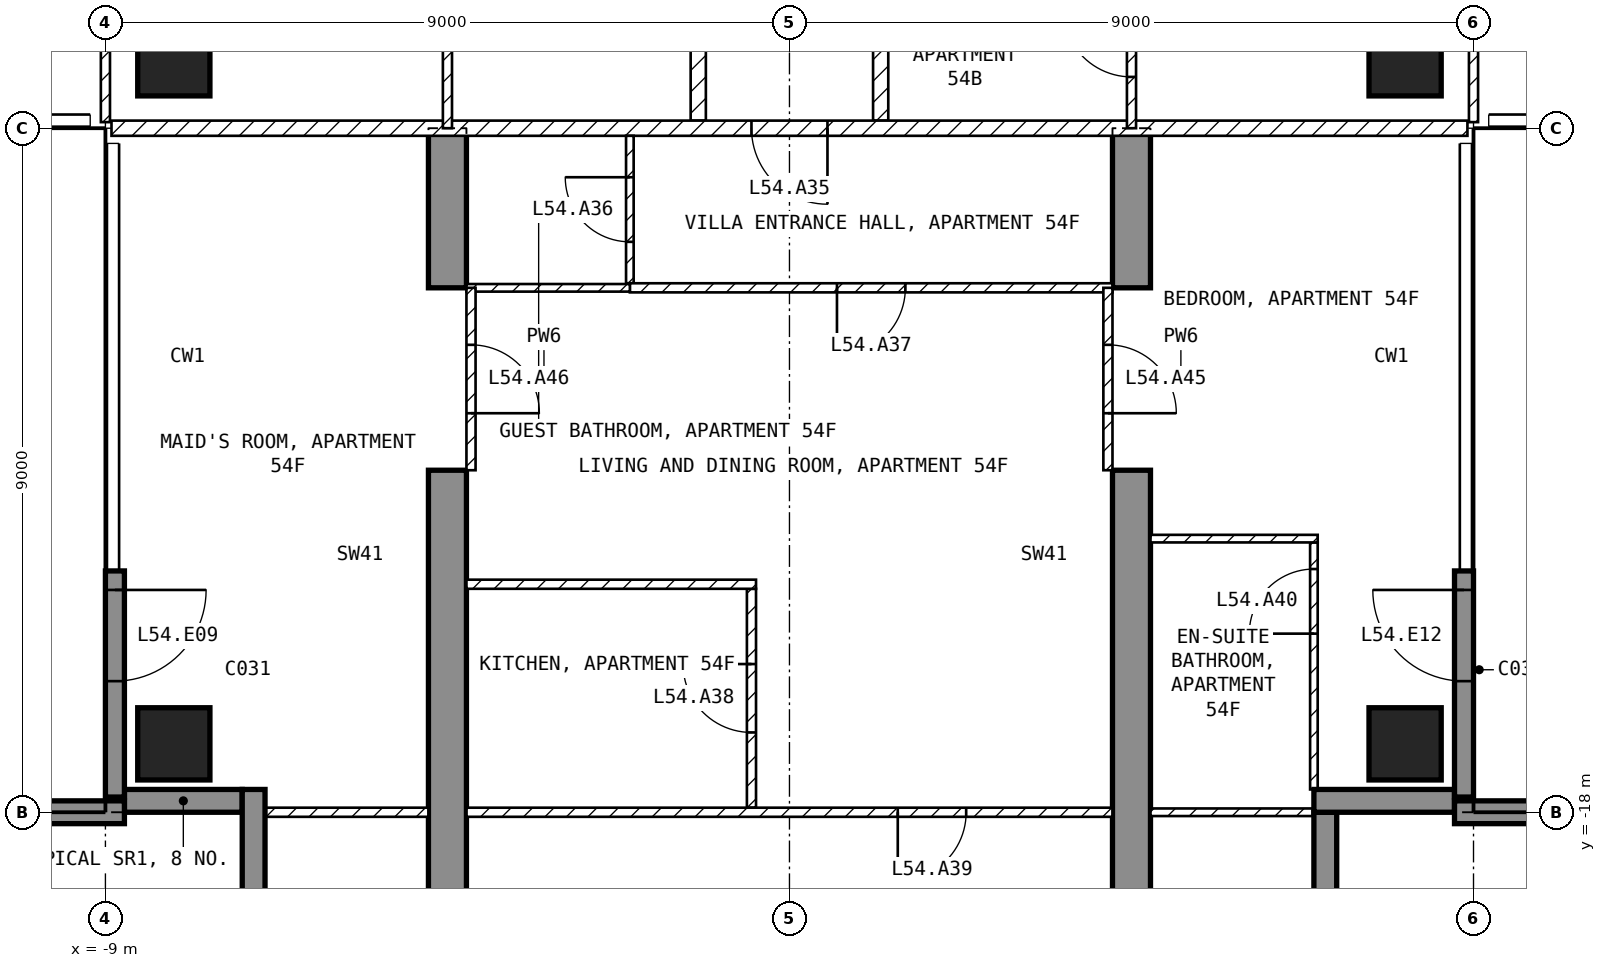
"""IFC4 building model, lengths in metres.
Left out: names, types, materials, properties, quantities, classifications, styles, units other than length and angle.
Written with IfcOpenShell. Run it as: python <this file> out.ifc"""

import sys

from ifc_helpers import new_model, si_unit, direction, frame, frame_2d, origin, origin_2d, place, context, subcontext, project, spatial, polyline, rectangle, outline, extrude, element, fill, save


model = new_model("IFC4")
c1 = context("Model", 3, precision=1e-05, world=origin(), true_north=direction((0.0, 1.0)))
c2 = subcontext(c1, "Body", "Model", "MODEL_VIEW")
j1 = project(units=[si_unit("LENGTHUNIT", "METRE"), si_unit("PLANEANGLEUNIT", "RADIAN")], contexts=[c1])
p1 = place(None, origin())
s1 = spatial("IfcSite", under=j1, at=p1, CompositionType="ELEMENT")
p2 = place(p1, origin())
s2 = spatial("IfcBuilding", under=s1, at=p2, CompositionType="ELEMENT")
p3 = place(p2, frame((0.0, 0.0, 215.6)))
s3 = spatial("IfcBuildingStorey", under=s2, at=p3, CompositionType="ELEMENT", Elevation=215.6)
for number, where, z_axis, x_axis in (
    (1, (-8.1, -17.1, -0.25), (0.0, 0.0, 1.0), (1.0, 0.0, 0.0)),
    (2, (-8.1, -8.1, -0.25), (0.0, 0.0, 1.0), (1.0, 0.0, 0.0)),
    (3, (8.1, -17.1, -0.25), (0.0, 0.0, 1.0), (1.0, 0.0, 0.0)),
    (4, (8.1, -8.1, -0.25), (0.0, 0.0, 1.0), (1.0, 0.0, 0.0)),
):
    element("IfcColumn", number, at=place(p3, frame(where, z_axis=z_axis, x_axis=x_axis)), inside=s3, PredefinedType="COLUMN", context=c2, shape_type="SweptSolid", body=[
        extrude(rectangle(XDim=0.95, YDim=0.95, at=origin_2d()), origin(), (0.0, 0.0, 1.0), 3.5),
    ])
for number, where, z_axis, x_axis in (
    (5, (-4.75, -20.225, -0.25), (1.0, 0.0, 0.0), (0.0, 1.0, 0.0)),
    (6, (4.25, -20.225, -0.25), (1.0, 0.0, 0.0), (0.0, 1.0, 0.0)),
):
    element("IfcWall", number, at=place(p3, frame(where, z_axis=z_axis, x_axis=x_axis)), inside=s3, PredefinedType="SHEAR", context=c2, shape_type="SweptSolid", body=[
        extrude(outline(polyline([(0.0, 0.0), (6.725, 0.0), (6.725, 2.65), (9.125, 2.65), (9.125, 0.0), (11.225, 0.0), (11.225, 3.5), (0.0, 3.5), (0.0, 0.0)])), origin(), (0.0, 0.0, 1.0), 0.5),
    ])
p4 = place(p3, frame((-8.875, -14.825, 0.0), z_axis=(0.0, 0.0, 1.0), x_axis=(0.0, -1.0, 0.0)))
e7 = element("IfcWall", 7, at=p4, inside=s3, PredefinedType="SOLIDWALL", context=c2, shape_type="SweptSolid", body=[
    extrude(rectangle(XDim=2.975, YDim=0.25, at=frame_2d((1.488, 0.0))), origin(), (0.0, 0.0, 1.0), 3.25),
])
p5 = place(p4, frame((0.25, 0.0, 0.0)))
e8 = element("IfcOpeningElement", 8, at=p5, cuts=e7, PredefinedType="OPENING", context=c2, shape_type="SweptSolid", body=[
    extrude(rectangle(XDim=1.2, YDim=2.4, at=frame_2d((0.6, 1.2))), frame((0.0, 0.135, 0.0), z_axis=(0.0, -1.0, 0.0), x_axis=(1.0, 0.0, 0.0)), (0.0, 0.0, 1.0), 0.27),
])
p6 = place(p3, frame((8.875, -17.8, 0.0), z_axis=(0.0, 0.0, 1.0), x_axis=(0.0, 1.0, 0.0)))
e9 = element("IfcWall", 9, at=p6, inside=s3, PredefinedType="SOLIDWALL", context=c2, shape_type="SweptSolid", body=[
    extrude(rectangle(XDim=2.975, YDim=0.25, at=frame_2d((1.488, 0.0))), origin(), (0.0, 0.0, 1.0), 3.25),
])
p7 = place(p6, frame((1.525, 0.0, 0.0)))
e10 = element("IfcOpeningElement", 10, at=p7, cuts=e9, PredefinedType="OPENING", context=c2, shape_type="SweptSolid", body=[
    extrude(rectangle(XDim=1.2, YDim=2.4, at=frame_2d((0.6, 1.2))), frame((0.0, 0.135, 0.0), z_axis=(0.0, -1.0, 0.0), x_axis=(1.0, 0.0, 0.0)), (0.0, 0.0, 1.0), 0.27),
])
p8 = place(p3, frame((7.05, -19.8, 0.0), z_axis=(0.0, 0.0, 1.0), x_axis=(0.0, 1.0, 0.0)))
e11 = element("IfcWall", 11, at=p8, inside=s3, PredefinedType="SOLIDWALL", context=c2, shape_type="SweptSolid", body=[
    extrude(rectangle(XDim=1.8, YDim=0.3, at=frame_2d((0.9, 0.0))), origin(), (0.0, 0.0, 1.0), 3.25),
])
p9 = place(p3, frame((6.9, -17.85, 0.0), z_axis=(0.0, 0.0, 1.0), x_axis=(1.0, 0.0, 0.0)))
e12 = element("IfcWall", 12, at=p9, inside=s3, PredefinedType="SOLIDWALL", context=c2, shape_type="SweptSolid", body=[
    extrude(rectangle(XDim=1.85, YDim=0.3, at=frame_2d((0.925, 0.0))), origin(), (0.0, 0.0, 1.0), 3.25),
])
p10 = place(p3, frame((-8.75, -17.85, 0.0), z_axis=(0.0, 0.0, 1.0), x_axis=(1.0, 0.0, 0.0)))
e13 = element("IfcWall", 13, at=p10, inside=s3, PredefinedType="SOLIDWALL", context=c2, shape_type="SweptSolid", body=[
    extrude(rectangle(XDim=1.55, YDim=0.3, at=frame_2d((0.775, 0.0))), origin(), (0.0, 0.0, 1.0), 3.25),
])
p11 = place(p3, frame((-7.05, -17.7, 0.0), z_axis=(0.0, 0.0, 1.0), x_axis=(0.0, -1.0, 0.0)))
e14 = element("IfcWall", 14, at=p11, inside=s3, PredefinedType="SOLIDWALL", context=c2, shape_type="SweptSolid", body=[
    extrude(rectangle(XDim=1.8, YDim=0.3, at=frame_2d((0.9, 0.0))), origin(), (0.0, 0.0, 1.0), 3.25),
])
for number, where, z_axis, x_axis in (
    (15, (-8.75, -18.0, 0.0), (0.0, 0.0, 1.0), (-1.0, 0.0, 0.0)),
    (16, (8.75, -18.0, 0.0), (0.0, 0.0, 1.0), (1.0, 0.0, 0.0)),
):
    element("IfcWall", number, at=place(p3, frame(where, z_axis=z_axis, x_axis=x_axis)), inside=s3, PredefinedType="SOLIDWALL", context=c2, shape_type="SweptSolid", body=[
        extrude(rectangle(XDim=2.95, YDim=0.3, at=frame_2d((1.475, 0.0))), origin(), (0.0, 0.0, 1.0), 3.25),
    ])
for number, where, z_axis, x_axis in (
    (17, (1.2, -4.6, 0.0), (0.0, 0.0, 1.0), (0.0, -1.0, 0.0)),
    (18, (-1.2, -8.9, 0.0), (0.0, 0.0, 1.0), (0.0, 1.0, 0.0)),
):
    element("IfcWall", number, at=place(p3, frame(where, z_axis=z_axis, x_axis=x_axis)), inside=s3, PredefinedType="PARTITIONING", context=c2, shape_type="SweptSolid", body=[
        extrude(rectangle(XDim=4.3, YDim=0.2, at=frame_2d((2.15, 0.0))), origin(), (0.0, 0.0, 1.0), 3.25),
    ])
p12 = place(p3, frame((8.92, -9.0, 0.0), z_axis=(0.0, 0.0, 1.0), x_axis=(-1.0, 0.0, 0.0)))
e19 = element("IfcWall", 19, at=p12, inside=s3, PredefinedType="PARTITIONING", context=c2, shape_type="SweptSolid", body=[
    extrude(rectangle(XDim=17.84, YDim=0.2, at=frame_2d((8.92, 0.0))), origin(), (0.0, 0.0, 1.0), 3.25),
])
p13 = place(p12, frame((8.42, 0.0, 0.0)))
e20 = element("IfcOpeningElement", 20, at=p13, cuts=e19, PredefinedType="OPENING", context=c2, shape_type="SweptSolid", body=[
    extrude(rectangle(XDim=1.0, YDim=2.1, at=frame_2d((0.5, 1.05))), frame((0.0, 0.11, 0.0), z_axis=(0.0, -1.0, 0.0), x_axis=(1.0, 0.0, 0.0)), (0.0, 0.0, 1.0), 0.22),
])
p14 = place(p3, frame((9.0, -8.92, 0.0), z_axis=(0.0, 0.0, 1.0), x_axis=(0.0, 1.0, 0.0)))
e21 = element("IfcWall", 21, at=p14, inside=s3, PredefinedType="PARTITIONING", context=c2, shape_type="SweptSolid", body=[
    extrude(rectangle(XDim=7.62, YDim=0.12, at=frame_2d((3.81, 0.0))), origin(), (0.0, 0.0, 1.0), 3.25),
])
p15 = place(p14, frame((2.42, 0.0, 0.0)))
e22 = element("IfcOpeningElement", 22, at=p15, cuts=e21, PredefinedType="OPENING", context=c2, shape_type="SweptSolid", body=[
    extrude(rectangle(XDim=0.9, YDim=2.1, at=frame_2d((0.45, 1.05))), frame((0.0, 0.07, 0.0), z_axis=(0.0, -1.0, 0.0), x_axis=(1.0, 0.0, 0.0)), (0.0, 0.0, 1.0), 0.14),
])
p16 = place(p3, frame((4.5, -9.0, 0.0), z_axis=(0.0, 0.0, 1.0), x_axis=(0.0, 1.0, 0.0)))
e23 = element("IfcWall", 23, at=p16, inside=s3, PredefinedType="PARTITIONING", context=c2, shape_type="SweptSolid", body=[
    extrude(rectangle(XDim=2.25, YDim=0.12, at=frame_2d((1.125, 0.0))), origin(), (0.0, 0.0, 1.0), 3.25),
])
p17 = place(p16, frame((0.675, 0.0, 0.0)))
e24 = element("IfcOpeningElement", 24, at=p17, cuts=e23, PredefinedType="OPENING", context=c2, shape_type="SweptSolid", body=[
    extrude(rectangle(XDim=0.9, YDim=2.1, at=frame_2d((0.45, 1.05))), frame((0.0, 0.07, 0.0), z_axis=(0.0, -1.0, 0.0), x_axis=(1.0, 0.0, 0.0)), (0.0, 0.0, 1.0), 0.14),
])
p18 = place(p3, frame((-9.0, -4.56, 0.0), z_axis=(0.0, 0.0, 1.0), x_axis=(0.0, -1.0, 0.0)))
e25 = element("IfcWall", 25, at=p18, inside=s3, PredefinedType="PARTITIONING", context=c2, shape_type="SweptSolid", body=[
    extrude(rectangle(XDim=4.36, YDim=0.12, at=frame_2d((2.18, 0.0))), origin(), (0.0, 0.0, 1.0), 3.25),
])
p19 = place(p18, frame((1.02, 0.0, 0.0)))
e26 = element("IfcOpeningElement", 26, at=p19, cuts=e25, PredefinedType="OPENING", context=c2, shape_type="SweptSolid", body=[
    extrude(rectangle(XDim=0.9, YDim=2.1, at=frame_2d((0.45, 1.05))), frame((0.0, 0.07, 0.0), z_axis=(0.0, -1.0, 0.0), x_axis=(1.0, 0.0, 0.0)), (0.0, 0.0, 1.0), 0.14),
])
p20 = place(p3, frame((-4.5, -4.6, 0.0), z_axis=(0.0, 0.0, 1.0), x_axis=(0.0, -1.0, 0.0)))
e27 = element("IfcWall", 27, at=p20, inside=s3, PredefinedType="PARTITIONING", context=c2, shape_type="SweptSolid", body=[
    extrude(rectangle(XDim=4.4, YDim=0.12, at=frame_2d((2.2, 0.0))), origin(), (0.0, 0.0, 1.0), 3.25),
])
p21 = place(p20, frame((1.75, 0.0, 0.0)))
e28 = element("IfcOpeningElement", 28, at=p21, cuts=e27, PredefinedType="OPENING", context=c2, shape_type="SweptSolid", body=[
    extrude(rectangle(XDim=0.9, YDim=2.1, at=frame_2d((0.45, 1.05))), frame((0.0, 0.07, 0.0), z_axis=(0.0, -1.0, 0.0), x_axis=(1.0, 0.0, 0.0)), (0.0, 0.0, 1.0), 0.14),
])
p22 = place(p3, frame((-2.1, -11.04, 0.0), z_axis=(0.0, 0.0, 1.0), x_axis=(0.0, 1.0, 0.0)))
e29 = element("IfcWall", 29, at=p22, inside=s3, PredefinedType="PARTITIONING", context=c2, shape_type="SweptSolid", body=[
    extrude(rectangle(XDim=1.94, YDim=0.1, at=frame_2d((0.97, 0.0))), origin(), (0.0, 0.0, 1.0), 3.25),
])
p23 = place(p22, frame((0.545, 0.0, 0.0)))
e30 = element("IfcOpeningElement", 30, at=p23, cuts=e29, PredefinedType="OPENING", context=c2, shape_type="SweptSolid", body=[
    extrude(rectangle(XDim=0.85, YDim=2.1, at=frame_2d((0.425, 1.05))), frame((0.0, 0.06, 0.0), z_axis=(0.0, -1.0, 0.0), x_axis=(1.0, 0.0, 0.0)), (0.0, 0.0, 1.0), 0.12),
])
p24 = place(p3, frame((4.25, -11.1, 0.0), z_axis=(0.0, 0.0, 1.0), x_axis=(-1.0, 0.0, 0.0)))
e31 = element("IfcWall", 31, at=p24, inside=s3, PredefinedType="PARTITIONING", context=c2, shape_type="SweptSolid", body=[
    extrude(rectangle(XDim=6.35, YDim=0.12, at=frame_2d((3.175, 0.0))), origin(), (0.0, 0.0, 1.0), 3.25),
])
p25 = place(p24, frame((2.725, 0.0, 0.0)))
e32 = element("IfcOpeningElement", 32, at=p25, cuts=e31, PredefinedType="OPENING", context=c2, shape_type="SweptSolid", body=[
    extrude(rectangle(XDim=0.9, YDim=2.1, at=frame_2d((0.45, 1.05))), frame((0.0, 0.07, 0.0), z_axis=(0.0, -1.0, 0.0), x_axis=(1.0, 0.0, 0.0)), (0.0, 0.0, 1.0), 0.14),
])
p26 = place(p3, frame((-2.1, -11.1, 0.0), z_axis=(0.0, 0.0, 1.0), x_axis=(-1.0, 0.0, 0.0)))
e33 = element("IfcWall", 33, at=p26, inside=s3, PredefinedType="PARTITIONING", context=c2, shape_type="SweptSolid", body=[
    extrude(rectangle(XDim=2.15, YDim=0.1, at=frame_2d((1.075, 0.0))), origin(), (0.0, 0.0, 1.0), 3.25),
])
p27 = place(p3, frame((-0.5, -17.94, 0.0), z_axis=(0.0, 0.0, 1.0), x_axis=(0.0, 1.0, 0.0)))
e34 = element("IfcWall", 34, at=p27, inside=s3, PredefinedType="PARTITIONING", context=c2, shape_type="SweptSolid", body=[
    extrude(rectangle(XDim=2.88, YDim=0.12, at=frame_2d((1.44, 0.0))), origin(), (0.0, 0.0, 1.0), 3.25),
])
p28 = place(p27, frame((0.99, 0.0, 0.0)))
e35 = element("IfcOpeningElement", 35, at=p28, cuts=e34, PredefinedType="OPENING", context=c2, shape_type="SweptSolid", body=[
    extrude(rectangle(XDim=0.9, YDim=2.1, at=frame_2d((0.45, 1.05))), frame((0.0, 0.07, 0.0), z_axis=(0.0, -1.0, 0.0), x_axis=(1.0, 0.0, 0.0)), (0.0, 0.0, 1.0), 0.14),
])
p29 = place(p3, frame((-0.44, -15.0, 0.0), z_axis=(0.0, 0.0, 1.0), x_axis=(-1.0, 0.0, 0.0)))
e36 = element("IfcWall", 36, at=p29, inside=s3, PredefinedType="PARTITIONING", context=c2, shape_type="SweptSolid", body=[
    extrude(rectangle(XDim=3.81, YDim=0.12, at=frame_2d((1.905, 0.0))), origin(), (0.0, 0.0, 1.0), 3.25),
])
p30 = place(p3, frame((4.25, -18.0, 0.0), z_axis=(0.0, 0.0, 1.0), x_axis=(-1.0, 0.0, 0.0)))
e37 = element("IfcWall", 37, at=p30, inside=s3, PredefinedType="PARTITIONING", context=c2, shape_type="SweptSolid", body=[
    extrude(rectangle(XDim=8.5, YDim=0.12, at=frame_2d((4.25, 0.0))), origin(), (0.0, 0.0, 1.0), 3.25),
])
p31 = place(p30, frame((1.925, 0.0, 0.0)))
e38 = element("IfcOpeningElement", 38, at=p31, cuts=e37, PredefinedType="OPENING", context=c2, shape_type="SweptSolid", body=[
    extrude(rectangle(XDim=0.9, YDim=2.1, at=frame_2d((0.45, 1.05))), frame((0.0, 0.07, 0.0), z_axis=(0.0, -1.0, 0.0), x_axis=(1.0, 0.0, 0.0)), (0.0, 0.0, 1.0), 0.14),
])
p32 = place(p3, frame((6.9, -17.7, 0.0), z_axis=(0.0, 0.0, 1.0), x_axis=(0.0, 1.0, 0.0)))
e39 = element("IfcWall", 39, at=p32, inside=s3, PredefinedType="PARTITIONING", context=c2, shape_type="SweptSolid", body=[
    extrude(rectangle(XDim=3.25, YDim=0.1, at=frame_2d((1.625, 0.0))), origin(), (0.0, 0.0, 1.0), 3.25),
])
p33 = place(p32, frame((2.05, 0.0, 0.0)))
e40 = element("IfcOpeningElement", 40, at=p33, cuts=e39, PredefinedType="OPENING", context=c2, shape_type="SweptSolid", body=[
    extrude(rectangle(XDim=0.85, YDim=2.1, at=frame_2d((0.425, 1.05))), frame((0.0, 0.06, 0.0), z_axis=(0.0, -1.0, 0.0), x_axis=(1.0, 0.0, 0.0)), (0.0, 0.0, 1.0), 0.12),
])
p34 = place(p3, frame((6.95, -14.4, 0.0), z_axis=(0.0, 0.0, 1.0), x_axis=(-1.0, 0.0, 0.0)))
e41 = element("IfcWall", 41, at=p34, inside=s3, PredefinedType="PARTITIONING", context=c2, shape_type="SweptSolid", body=[
    extrude(rectangle(XDim=2.2, YDim=0.1, at=frame_2d((1.1, 0.0))), origin(), (0.0, 0.0, 1.0), 3.25),
])
p35 = place(p3, frame((7.12, -18.0, 0.0), z_axis=(0.0, 0.0, 1.0), x_axis=(-1.0, 0.0, 0.0)))
e42 = element("IfcWall", 42, at=p35, inside=s3, PredefinedType="PARTITIONING", context=c2, shape_type="SweptSolid", body=[
    extrude(rectangle(XDim=2.37, YDim=0.1, at=frame_2d((1.185, 0.0))), origin(), (0.0, 0.0, 1.0), 3.25),
])
p36 = place(p3, frame((-4.75, -18.0, 0.0), z_axis=(0.0, 0.0, 1.0), x_axis=(-1.0, 0.0, 0.0)))
e43 = element("IfcWall", 43, at=p36, inside=s3, PredefinedType="PARTITIONING", context=c2, shape_type="SweptSolid", body=[
    extrude(rectangle(XDim=2.37, YDim=0.12, at=frame_2d((1.185, 0.0))), origin(), (0.0, 0.0, 1.0), 3.25),
])
p37 = place(p3, frame((4.19, -11.1, 0.0), z_axis=(0.0, 0.0, 1.0), x_axis=(0.0, -1.0, 0.0)))
e44 = element("IfcWall", 44, at=p37, inside=s3, PredefinedType="PARTITIONING", context=c2, shape_type="SweptSolid", body=[
    extrude(rectangle(XDim=2.4, YDim=0.12, at=frame_2d((1.2, 0.0))), origin(), (0.0, 0.0, 1.0), 2.4),
])
p38 = place(p37, frame((0.75, 0.0, 0.0)))
e45 = element("IfcOpeningElement", 45, at=p38, cuts=e44, PredefinedType="OPENING", context=c2, shape_type="SweptSolid", body=[
    extrude(rectangle(XDim=0.9, YDim=2.1, at=frame_2d((0.45, 1.05))), frame((0.0, 0.07, 0.0), z_axis=(0.0, -1.0, 0.0), x_axis=(1.0, 0.0, 0.0)), (0.0, 0.0, 1.0), 0.14),
])
p39 = place(p3, frame((-4.19, -11.1, 0.0), z_axis=(0.0, 0.0, 1.0), x_axis=(0.0, -1.0, 0.0)))
e46 = element("IfcWall", 46, at=p39, inside=s3, PredefinedType="PARTITIONING", context=c2, shape_type="SweptSolid", body=[
    extrude(rectangle(XDim=2.4, YDim=0.12, at=frame_2d((1.2, 0.0))), origin(), (0.0, 0.0, 1.0), 2.4),
])
p40 = place(p39, frame((0.75, 0.0, 0.0)))
e47 = element("IfcOpeningElement", 47, at=p40, cuts=e46, PredefinedType="OPENING", context=c2, shape_type="SweptSolid", body=[
    extrude(rectangle(XDim=0.9, YDim=2.1, at=frame_2d((0.45, 1.05))), frame((0.0, 0.07, 0.0), z_axis=(0.0, -1.0, 0.0), x_axis=(1.0, 0.0, 0.0)), (0.0, 0.0, 1.0), 0.14),
])
p41 = place(p5, origin())
e48 = element("IfcDoor", 48, at=p41, inside=s3, OperationType="SINGLE_SWING_LEFT", PredefinedType="DOOR", context=c2, shape_type="SweptSolid", body=[
    extrude(rectangle(XDim=1.2, YDim=2.4, at=frame_2d((0.6, 1.2))), frame((0.0, 0.025, 0.0), z_axis=(0.0, -1.0, 0.0), x_axis=(1.0, 0.0, 0.0)), (0.0, 0.0, 1.0), 0.05),
])
fill(e8, e48)
p42 = place(p7, origin())
e49 = element("IfcDoor", 49, at=p42, inside=s3, OperationType="SINGLE_SWING_RIGHT", PredefinedType="DOOR", context=c2, shape_type="SweptSolid", body=[
    extrude(rectangle(XDim=1.2, YDim=2.4, at=frame_2d((0.6, 1.2))), frame((0.0, 0.025, 0.0), z_axis=(0.0, -1.0, 0.0), x_axis=(1.0, 0.0, 0.0)), (0.0, 0.0, 1.0), 0.05),
])
fill(e10, e49)
p43 = place(p17, origin())
e50 = element("IfcDoor", 50, at=p43, inside=s3, OperationType="SINGLE_SWING_RIGHT", PredefinedType="DOOR", context=c2, shape_type="SweptSolid", body=[
    extrude(rectangle(XDim=0.9, YDim=2.1, at=frame_2d((0.45, 1.05))), frame((0.0, 0.025, 0.0), z_axis=(0.0, -1.0, 0.0), x_axis=(1.0, 0.0, 0.0)), (0.0, 0.0, 1.0), 0.05),
])
fill(e24, e50)
p44 = place(p13, origin())
e51 = element("IfcDoor", 51, at=p44, inside=s3, OperationType="SINGLE_SWING_LEFT", PredefinedType="DOOR", context=c2, shape_type="SweptSolid", body=[
    extrude(rectangle(XDim=1.0, YDim=2.1, at=frame_2d((0.5, 1.05))), frame((0.0, 0.025, 0.0), z_axis=(0.0, -1.0, 0.0), x_axis=(1.0, 0.0, 0.0)), (0.0, 0.0, 1.0), 0.05),
])
fill(e20, e51)
p45 = place(p23, origin())
e52 = element("IfcDoor", 52, at=p45, inside=s3, OperationType="SINGLE_SWING_RIGHT", PredefinedType="DOOR", context=c2, shape_type="SweptSolid", body=[
    extrude(rectangle(XDim=0.85, YDim=2.1, at=frame_2d((0.425, 1.05))), frame((0.0, 0.025, 0.0), z_axis=(0.0, -1.0, 0.0), x_axis=(1.0, 0.0, 0.0)), (0.0, 0.0, 1.0), 0.05),
])
fill(e30, e52)
p46 = place(p25, origin())
e53 = element("IfcDoor", 53, at=p46, inside=s3, OperationType="SINGLE_SWING_RIGHT", PredefinedType="DOOR", context=c2, shape_type="SweptSolid", body=[
    extrude(rectangle(XDim=0.9, YDim=2.1, at=frame_2d((0.45, 1.05))), frame((0.0, 0.025, 0.0), z_axis=(0.0, -1.0, 0.0), x_axis=(1.0, 0.0, 0.0)), (0.0, 0.0, 1.0), 0.05),
])
fill(e32, e53)
p47 = place(p28, origin())
e54 = element("IfcDoor", 54, at=p47, inside=s3, OperationType="SINGLE_SWING_RIGHT", PredefinedType="DOOR", context=c2, shape_type="SweptSolid", body=[
    extrude(rectangle(XDim=0.9, YDim=2.1, at=frame_2d((0.45, 1.05))), frame((0.0, 0.025, 0.0), z_axis=(0.0, -1.0, 0.0), x_axis=(1.0, 0.0, 0.0)), (0.0, 0.0, 1.0), 0.05),
])
fill(e35, e54)
p48 = place(p31, origin())
e55 = element("IfcDoor", 55, at=p48, inside=s3, OperationType="SINGLE_SWING_RIGHT", PredefinedType="DOOR", context=c2, shape_type="SweptSolid", body=[
    extrude(rectangle(XDim=0.9, YDim=2.1, at=frame_2d((0.45, 1.05))), frame((0.0, 0.025, 0.0), z_axis=(0.0, -1.0, 0.0), x_axis=(1.0, 0.0, 0.0)), (0.0, 0.0, 1.0), 0.05),
])
fill(e38, e55)
p49 = place(p33, origin())
e56 = element("IfcDoor", 56, at=p49, inside=s3, OperationType="SINGLE_SWING_LEFT", PredefinedType="DOOR", context=c2, shape_type="SweptSolid", body=[
    extrude(rectangle(XDim=0.85, YDim=2.1, at=frame_2d((0.425, 1.05))), frame((0.0, 0.025, 0.0), z_axis=(0.0, -1.0, 0.0), x_axis=(1.0, 0.0, 0.0)), (0.0, 0.0, 1.0), 0.05),
])
fill(e40, e56)
p50 = place(p38, origin())
e57 = element("IfcDoor", 57, at=p50, inside=s3, OperationType="SINGLE_SWING_RIGHT", PredefinedType="DOOR", context=c2, shape_type="SweptSolid", body=[
    extrude(rectangle(XDim=0.9, YDim=2.1, at=frame_2d((0.45, 1.05))), frame((0.0, 0.025, 0.0), z_axis=(0.0, -1.0, 0.0), x_axis=(1.0, 0.0, 0.0)), (0.0, 0.0, 1.0), 0.05),
])
fill(e45, e57)
p51 = place(p40, origin())
e58 = element("IfcDoor", 58, at=p51, inside=s3, OperationType="SINGLE_SWING_RIGHT", PredefinedType="DOOR", context=c2, shape_type="SweptSolid", body=[
    extrude(rectangle(XDim=0.9, YDim=2.1, at=frame_2d((0.45, 1.05))), frame((0.0, 0.025, 0.0), z_axis=(0.0, -1.0, 0.0), x_axis=(1.0, 0.0, 0.0)), (0.0, 0.0, 1.0), 0.05),
])
fill(e47, e58)
save(model, sys.argv[1])
